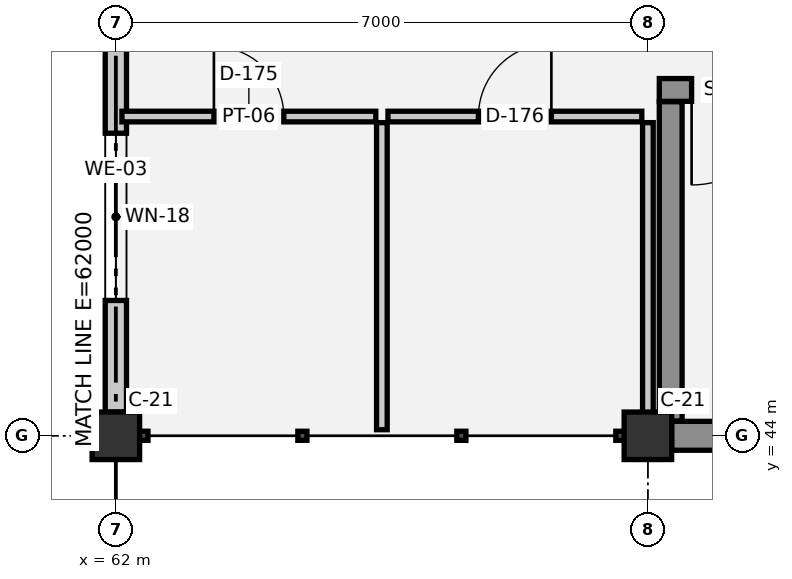
"""IFC4 building model, lengths in metres.
Left out: names, types, materials, properties, quantities, classifications, styles, units other than length and angle.
Written with IfcOpenShell. Run it as: python <this file> out.ifc"""

import sys

from ifc_helpers import new_model, si_unit, direction, frame, frame_2d, origin, origin_2d, place, context, subcontext, project, spatial, rectangle, extrude, element, fill, save


model = new_model("IFC4")
c1 = context("Model", 3, precision=1e-05, world=origin(), true_north=direction((0.0, 1.0)))
c2 = subcontext(c1, "Body", "Model", "MODEL_VIEW")
j1 = project(units=[si_unit("LENGTHUNIT", "METRE"), si_unit("PLANEANGLEUNIT", "RADIAN")], contexts=[c1])
p1 = place(None, origin())
s1 = spatial("IfcSite", under=j1, at=p1, CompositionType="ELEMENT")
p2 = place(p1, origin())
s2 = spatial("IfcBuilding", under=s1, at=p2, CompositionType="ELEMENT")
p3 = place(p2, frame((0.0, 0.0, 25.8)))
s3 = spatial("IfcBuildingStorey", under=s2, at=p3, CompositionType="ELEMENT", Elevation=25.8)
for number, where, z_axis, x_axis in (
    (1, (62.0, 44.0, 0.0), (0.0, 0.0, 1.0), (1.0, 0.0, 0.0)),
    (2, (69.0, 44.0, 0.0), (0.0, 0.0, 1.0), (1.0, 0.0, 0.0)),
):
    element("IfcColumn", number, at=place(p3, frame(where, z_axis=z_axis, x_axis=x_axis)), inside=s3, PredefinedType="COLUMN", context=c2, shape_type="SweptSolid", body=[
        extrude(rectangle(XDim=0.625, YDim=0.625, at=origin_2d()), origin(), (0.0, 0.0, 1.0), 3.75),
    ])
p4 = place(p3, frame((62.0, 44.312, 0.0), z_axis=(0.0, 0.0, 1.0), x_axis=(0.0, 1.0, 0.0)))
e3 = element("IfcWall", 3, at=p4, inside=s3, PredefinedType="SOLIDWALL", context=c2, shape_type="SweptSolid", body=[
    extrude(rectangle(XDim=6.375, YDim=0.28, at=frame_2d((3.188, 0.0))), origin(), (0.0, 0.0, 1.0), 2.6),
])
p5 = place(p4, frame((1.468, 0.0, 1.0)))
e4 = element("IfcOpeningElement", 4, at=p5, cuts=e3, PredefinedType="OPENING", context=c2, shape_type="SweptSolid", body=[
    extrude(rectangle(XDim=2.2, YDim=1.0, at=frame_2d((1.1, 0.5))), frame((0.0, 0.15, 0.0), z_axis=(0.0, -1.0, 0.0), x_axis=(1.0, 0.0, 0.0)), (0.0, 0.0, 1.0), 0.3),
])
p6 = place(p3, frame((76.688, 44.0, 0.0), z_axis=(0.0, 0.0, 1.0), x_axis=(-1.0, 0.0, 0.0)))
e5 = element("IfcWall", 5, at=p6, inside=s3, PredefinedType="STANDARD", context=c2, shape_type="SweptSolid", body=[
    extrude(rectangle(XDim=7.375, YDim=0.38, at=frame_2d((3.688, 0.0))), origin(), (0.0, 0.0, 1.0), 2.6),
])
p7 = place(p3, frame((76.85, 48.55, 0.0), z_axis=(0.0, 0.0, 1.0), x_axis=(-1.0, 0.0, 0.0)))
e6 = element("IfcWall", 6, at=p7, inside=s3, PredefinedType="SHEAR", context=c2, shape_type="SweptSolid", body=[
    extrude(rectangle(XDim=7.7, YDim=0.3, at=frame_2d((3.85, 0.0))), origin(), (0.0, 0.0, 1.0), 3.47),
])
p8 = place(p7, frame((6.025, 0.0, 0.0)))
e7 = element("IfcOpeningElement", 7, at=p8, cuts=e6, PredefinedType="OPENING", context=c2, shape_type="SweptSolid", body=[
    extrude(rectangle(XDim=1.25, YDim=2.15, at=frame_2d((0.625, 1.075))), frame((0.0, 0.16, 0.0), z_axis=(0.0, -1.0, 0.0), x_axis=(1.0, 0.0, 0.0)), (0.0, 0.0, 1.0), 0.32),
])
p9 = place(p3, frame((69.3, 48.395, 0.0), z_axis=(0.0, 0.0, 1.0), x_axis=(0.0, -1.0, 0.0)))
e8 = element("IfcWall", 8, at=p9, inside=s3, PredefinedType="SHEAR", context=c2, shape_type="SweptSolid", body=[
    extrude(rectangle(XDim=4.2, YDim=0.3, at=frame_2d((2.1, 0.0))), origin(), (0.0, 0.0, 1.0), 3.47),
])
p10 = place(p3, frame((62.08, 48.2, 0.0), z_axis=(0.0, 0.0, 1.0), x_axis=(1.0, 0.0, 0.0)))
e9 = element("IfcWall", 9, at=p10, inside=s3, PredefinedType="PLUMBINGWALL", context=c2, shape_type="SweptSolid", body=[
    extrude(rectangle(XDim=3.34, YDim=0.14, at=frame_2d((1.67, 0.0))), origin(), (0.0, 0.0, 1.0), 3.39),
])
p11 = place(p10, frame((1.21, 0.0, 0.0)))
e10 = element("IfcOpeningElement", 10, at=p11, cuts=e9, PredefinedType="OPENING", context=c2, shape_type="SweptSolid", body=[
    extrude(rectangle(XDim=0.92, YDim=2.1, at=frame_2d((0.46, 1.05))), frame((0.0, 0.08, 0.0), z_axis=(0.0, -1.0, 0.0), x_axis=(1.0, 0.0, 0.0)), (0.0, 0.0, 1.0), 0.16),
])
p12 = place(p3, frame((65.58, 48.2, 0.0), z_axis=(0.0, 0.0, 1.0), x_axis=(1.0, 0.0, 0.0)))
e11 = element("IfcWall", 11, at=p12, inside=s3, PredefinedType="PLUMBINGWALL", context=c2, shape_type="SweptSolid", body=[
    extrude(rectangle(XDim=3.34, YDim=0.14, at=frame_2d((1.67, 0.0))), origin(), (0.0, 0.0, 1.0), 3.39),
])
p13 = place(p12, frame((1.19, 0.0, 0.0)))
e12 = element("IfcOpeningElement", 12, at=p13, cuts=e11, PredefinedType="OPENING", context=c2, shape_type="SweptSolid", body=[
    extrude(rectangle(XDim=0.96, YDim=2.1, at=frame_2d((0.48, 1.05))), frame((0.0, 0.08, 0.0), z_axis=(0.0, -1.0, 0.0), x_axis=(1.0, 0.0, 0.0)), (0.0, 0.0, 1.0), 0.16),
])
p14 = place(p3, frame((65.5, 44.08, 0.0), z_axis=(0.0, 0.0, 1.0), x_axis=(0.0, 1.0, 0.0)))
e13 = element("IfcWall", 13, at=p14, inside=s3, PredefinedType="PLUMBINGWALL", context=c2, shape_type="SweptSolid", body=[
    extrude(rectangle(XDim=4.04, YDim=0.14, at=frame_2d((2.02, 0.0))), origin(), (0.0, 0.0, 1.0), 3.39),
])
p15 = place(p3, frame((69.0, 44.08, 0.0), z_axis=(0.0, 0.0, 1.0), x_axis=(0.0, 1.0, 0.0)))
e14 = element("IfcWall", 14, at=p15, inside=s3, PredefinedType="PLUMBINGWALL", context=c2, shape_type="SweptSolid", body=[
    extrude(rectangle(XDim=4.04, YDim=0.14, at=frame_2d((2.02, 0.0))), origin(), (0.0, 0.0, 1.0), 2.92),
])
p16 = place(p5, origin())
e15 = element("IfcWindow", 15, at=p16, inside=s3, PartitioningType="SINGLE_PANEL", PredefinedType="WINDOW", context=c2, shape_type="SweptSolid", body=[
    extrude(rectangle(XDim=2.2, YDim=1.0, at=frame_2d((1.1, 0.5))), frame((0.0, 0.03, 0.0), z_axis=(0.0, -1.0, 0.0), x_axis=(1.0, 0.0, 0.0)), (0.0, 0.0, 1.0), 0.06),
])
fill(e4, e15)
p17 = place(p8, origin())
e16 = element("IfcDoor", 16, at=p17, inside=s3, OperationType="SINGLE_SWING_RIGHT", PredefinedType="DOOR", context=c2, shape_type="SweptSolid", body=[
    extrude(rectangle(XDim=1.25, YDim=2.15, at=frame_2d((0.625, 1.075))), frame((0.0, 0.025, 0.0), z_axis=(0.0, -1.0, 0.0), x_axis=(1.0, 0.0, 0.0)), (0.0, 0.0, 1.0), 0.05),
])
fill(e7, e16)
p18 = place(p11, origin())
e17 = element("IfcDoor", 17, at=p18, inside=s3, OperationType="SINGLE_SWING_LEFT", PredefinedType="DOOR", context=c2, shape_type="SweptSolid", body=[
    extrude(rectangle(XDim=0.92, YDim=2.1, at=frame_2d((0.46, 1.05))), frame((0.0, 0.025, 0.0), z_axis=(0.0, -1.0, 0.0), x_axis=(1.0, 0.0, 0.0)), (0.0, 0.0, 1.0), 0.05),
])
fill(e10, e17)
p19 = place(p13, origin())
e18 = element("IfcDoor", 18, at=p19, inside=s3, OperationType="SINGLE_SWING_RIGHT", PredefinedType="DOOR", context=c2, shape_type="SweptSolid", body=[
    extrude(rectangle(XDim=0.96, YDim=2.1, at=frame_2d((0.48, 1.05))), frame((0.0, 0.025, 0.0), z_axis=(0.0, -1.0, 0.0), x_axis=(1.0, 0.0, 0.0)), (0.0, 0.0, 1.0), 0.05),
])
fill(e12, e18)
save(model, sys.argv[1])
